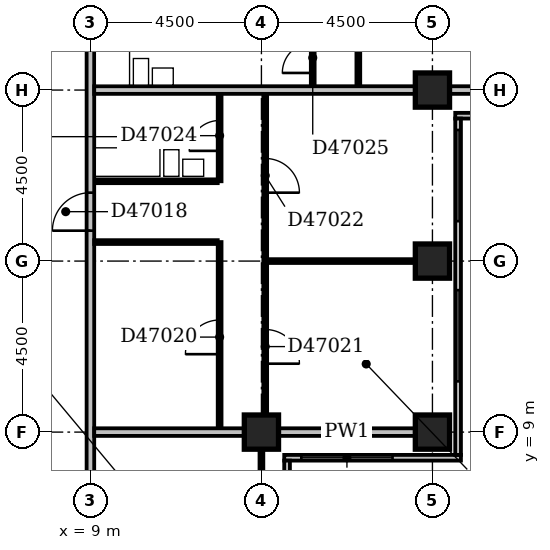
"""IFC4 building model, lengths in metres.
Left out: names, types, materials, properties, quantities, classifications, styles, units other than length and angle.
Written with IfcOpenShell. Run it as: python <this file> out.ifc"""

import sys

from ifc_helpers import new_model, si_unit, direction, frame, frame_2d, origin, origin_2d, place, context, subcontext, project, spatial, rectangle, extrude, element, fill, save


model = new_model("IFC4")
c1 = context("Model", 3, precision=1e-05, world=origin(), true_north=direction((0.0, 1.0)))
c2 = subcontext(c1, "Body", "Model", "MODEL_VIEW")
j1 = project(units=[si_unit("LENGTHUNIT", "METRE"), si_unit("PLANEANGLEUNIT", "RADIAN")], contexts=[c1])
p1 = place(None, origin())
s1 = spatial("IfcSite", under=j1, at=p1, CompositionType="ELEMENT")
p2 = place(p1, origin())
s2 = spatial("IfcBuilding", under=s1, at=p2, CompositionType="ELEMENT")
p3 = place(p2, frame((0.0, 0.0, 186.2)))
s3 = spatial("IfcBuildingStorey", under=s2, at=p3, CompositionType="ELEMENT", Elevation=186.2)
for number, where, z_axis, x_axis in (
    (1, (13.5, 9.0, -0.35), (0.0, 0.0, 1.0), (1.0, 0.0, 0.0)),
    (2, (18.0, 9.0, -0.35), (0.0, 0.0, 1.0), (1.0, 0.0, 0.0)),
    (3, (18.0, 13.5, -0.35), (0.0, 0.0, 1.0), (1.0, 0.0, 0.0)),
    (4, (18.0, 18.0, -0.35), (0.0, 0.0, 1.0), (1.0, 0.0, 0.0)),
):
    element("IfcColumn", number, at=place(p3, frame(where, z_axis=z_axis, x_axis=x_axis)), inside=s3, PredefinedType="COLUMN", context=c2, shape_type="SweptSolid", body=[
        extrude(rectangle(XDim=0.9, YDim=0.9, at=origin_2d()), origin(), (0.0, 0.0, 1.0), 3.65),
    ])
p4 = place(p3, frame((14.175, 3.9, 0.0), z_axis=(0.0, 0.0, 1.0), x_axis=(0.0, 1.0, 0.0)))
e5 = element("IfcWall", 5, at=p4, inside=s3, PredefinedType="STANDARD", context=c2, shape_type="SweptSolid", body=[
    extrude(rectangle(XDim=4.35, YDim=0.15, at=frame_2d((2.175, 0.0))), origin(), (0.0, 0.0, 1.0), 2.7),
])
p5 = place(p4, frame((1.65, 0.0, 0.6)))
e6 = element("IfcOpeningElement", 6, at=p5, cuts=e5, PredefinedType="OPENING", context=c2, shape_type="SweptSolid", body=[
    extrude(rectangle(XDim=2.4, YDim=1.8, at=frame_2d((1.2, 0.9))), frame((0.0, 0.087, 0.0), z_axis=(0.0, -1.0, 0.0), x_axis=(1.0, 0.0, 0.0)), (0.0, 0.0, 1.0), 0.174),
])
p6 = place(p3, frame((14.1, 8.325, 0.0), z_axis=(0.0, 0.0, 1.0), x_axis=(1.0, 0.0, 0.0)))
e7 = element("IfcWall", 7, at=p6, inside=s3, PredefinedType="STANDARD", context=c2, shape_type="SweptSolid", body=[
    extrude(rectangle(XDim=4.65, YDim=0.15, at=frame_2d((2.325, 0.0))), origin(), (0.0, 0.0, 1.0), 2.7),
])
p7 = place(p6, frame((0.45, 0.0, 0.6)))
e8 = element("IfcOpeningElement", 8, at=p7, cuts=e7, PredefinedType="OPENING", context=c2, shape_type="SweptSolid", body=[
    extrude(rectangle(XDim=2.4, YDim=1.8, at=frame_2d((1.2, 0.9))), frame((0.0, 0.087, 0.0), z_axis=(0.0, -1.0, 0.0), x_axis=(1.0, 0.0, 0.0)), (0.0, 0.0, 1.0), 0.174),
])
p8 = place(p3, frame((18.675, 8.4, 0.0), z_axis=(0.0, 0.0, 1.0), x_axis=(0.0, 1.0, 0.0)))
e9 = element("IfcWall", 9, at=p8, inside=s3, PredefinedType="STANDARD", context=c2, shape_type="SweptSolid", body=[
    extrude(rectangle(XDim=8.85, YDim=0.15, at=frame_2d((4.425, 0.0))), origin(), (0.0, 0.0, 1.0), 2.7),
])
p9 = place(p8, frame((1.935, 0.0, 0.6)))
e10 = element("IfcOpeningElement", 10, at=p9, cuts=e9, PredefinedType="OPENING", context=c2, shape_type="SweptSolid", body=[
    extrude(rectangle(XDim=2.4, YDim=1.8, at=frame_2d((1.2, 0.9))), frame((0.0, 0.087, 0.0), z_axis=(0.0, -1.0, 0.0), x_axis=(1.0, 0.0, 0.0)), (0.0, 0.0, 1.0), 0.174),
])
p10 = place(p8, frame((6.15, 0.0, 0.6)))
e11 = element("IfcOpeningElement", 11, at=p10, cuts=e9, PredefinedType="OPENING", context=c2, shape_type="SweptSolid", body=[
    extrude(rectangle(XDim=2.4, YDim=1.8, at=frame_2d((1.2, 0.9))), frame((0.0, 0.087, 0.0), z_axis=(0.0, -1.0, 0.0), x_axis=(1.0, 0.0, 0.0)), (0.0, 0.0, 1.0), 0.174),
])
p11 = place(p3, frame((18.6, 17.325, 0.0), z_axis=(0.0, 0.0, 1.0), x_axis=(1.0, 0.0, 0.0)))
e12 = element("IfcWall", 12, at=p11, inside=s3, PredefinedType="STANDARD", context=c2, shape_type="SweptSolid", body=[
    extrude(rectangle(XDim=4.65, YDim=0.15, at=frame_2d((2.325, 0.0))), origin(), (0.0, 0.0, 1.0), 2.7),
])
p12 = place(p11, frame((0.45, 0.0, 0.6)))
e13 = element("IfcOpeningElement", 13, at=p12, cuts=e12, PredefinedType="OPENING", context=c2, shape_type="SweptSolid", body=[
    extrude(rectangle(XDim=2.4, YDim=1.8, at=frame_2d((1.2, 0.9))), frame((0.0, 0.087, 0.0), z_axis=(0.0, -1.0, 0.0), x_axis=(1.0, 0.0, 0.0)), (0.0, 0.0, 1.0), 0.174),
])
p13 = place(p3, frame((13.5, 4.95, 0.0), z_axis=(0.0, 0.0, 1.0), x_axis=(0.0, 1.0, 0.0)))
e14 = element("IfcWall", 14, at=p13, inside=s3, PredefinedType="PARTITIONING", context=c2, shape_type="SweptSolid", body=[
    extrude(rectangle(XDim=3.6, YDim=0.1, at=frame_2d((1.8, 0.0))), origin(), (0.0, 0.0, 1.0), 2.7),
])
p14 = place(p3, frame((9.0, 5.0, 0.0), z_axis=(0.0, 0.0, 1.0), x_axis=(0.0, 1.0, 0.0)))
e15 = element("IfcWall", 15, at=p14, inside=s3, PredefinedType="PARTITIONING", context=c2, shape_type="SweptSolid", body=[
    extrude(rectangle(XDim=31.0, YDim=0.2, at=frame_2d((15.5, 0.0))), origin(), (0.0, 0.0, 1.0), 3.3),
])
p15 = place(p14, frame((17.8, 0.0, 0.0)))
e16 = element("IfcOpeningElement", 16, at=p15, cuts=e15, PredefinedType="OPENING", context=c2, shape_type="SweptSolid", body=[
    extrude(rectangle(XDim=1.0, YDim=2.1, at=frame_2d((0.5, 1.05))), frame((0.0, 0.112, 0.0), z_axis=(0.0, -1.0, 0.0), x_axis=(1.0, 0.0, 0.0)), (0.0, 0.0, 1.0), 0.224),
])
p16 = place(p14, frame((14.95, 0.0, 0.0)))
e17 = element("IfcOpeningElement", 17, at=p16, cuts=e15, PredefinedType="OPENING", context=c2, shape_type="SweptSolid", body=[
    extrude(rectangle(XDim=1.0, YDim=2.1, at=frame_2d((0.5, 1.05))), frame((0.0, 0.112, 0.0), z_axis=(0.0, -1.0, 0.0), x_axis=(1.0, 0.0, 0.0)), (0.0, 0.0, 1.0), 0.224),
])
p17 = place(p14, frame((9.3, 0.0, 0.0)))
e18 = element("IfcOpeningElement", 18, at=p17, cuts=e15, PredefinedType="OPENING", context=c2, shape_type="SweptSolid", body=[
    extrude(rectangle(XDim=1.0, YDim=2.1, at=frame_2d((0.5, 1.05))), frame((0.0, 0.112, 0.0), z_axis=(0.0, -1.0, 0.0), x_axis=(1.0, 0.0, 0.0)), (0.0, 0.0, 1.0), 0.224),
])
p18 = place(p14, frame((1.5, 0.0, 0.0)))
e19 = element("IfcOpeningElement", 19, at=p18, cuts=e15, PredefinedType="OPENING", context=c2, shape_type="SweptSolid", body=[
    extrude(rectangle(XDim=0.9, YDim=2.1, at=frame_2d((0.45, 1.05))), frame((0.0, 0.112, 0.0), z_axis=(0.0, -1.0, 0.0), x_axis=(1.0, 0.0, 0.0)), (0.0, 0.0, 1.0), 0.224),
])
p19 = place(p3, frame((9.1, 9.0, 0.0), z_axis=(0.0, 0.0, 1.0), x_axis=(1.0, 0.0, 0.0)))
e20 = element("IfcWall", 20, at=p19, inside=s3, PredefinedType="PARTITIONING", context=c2, shape_type="SweptSolid", body=[
    extrude(rectangle(XDim=3.95, YDim=0.2, at=frame_2d((1.975, 0.0))), origin(), (0.0, 0.0, 1.0), 3.3),
])
p20 = place(p3, frame((13.95, 9.0, 0.0), z_axis=(0.0, 0.0, 1.0), x_axis=(1.0, 0.0, 0.0)))
e21 = element("IfcWall", 21, at=p20, inside=s3, PredefinedType="PARTITIONING", context=c2, shape_type="SweptSolid", body=[
    extrude(rectangle(XDim=3.6, YDim=0.2, at=frame_2d((1.8, 0.0))), origin(), (0.0, 0.0, 1.0), 2.7),
])
p21 = place(p3, frame((12.4, 9.1, 0.0), z_axis=(0.0, 0.0, 1.0), x_axis=(0.0, 1.0, 0.0)))
e22 = element("IfcWall", 22, at=p21, inside=s3, PredefinedType="PARTITIONING", context=c2, shape_type="SweptSolid", body=[
    extrude(rectangle(XDim=4.9, YDim=0.1, at=frame_2d((2.45, 0.0))), origin(), (0.0, 0.0, 1.0), 3.3),
])
p22 = place(p21, frame((1.95, 0.0, 0.0)))
e23 = element("IfcOpeningElement", 23, at=p22, cuts=e22, PredefinedType="OPENING", context=c2, shape_type="SweptSolid", body=[
    extrude(rectangle(XDim=0.9, YDim=2.1, at=frame_2d((0.45, 1.05))), frame((0.0, 0.062, 0.0), z_axis=(0.0, -1.0, 0.0), x_axis=(1.0, 0.0, 0.0)), (0.0, 0.0, 1.0), 0.124),
])
p23 = place(p3, frame((13.6, 9.45, 0.0), z_axis=(0.0, 0.0, 1.0), x_axis=(0.0, 1.0, 0.0)))
e24 = element("IfcWall", 24, at=p23, inside=s3, PredefinedType="PARTITIONING", context=c2, shape_type="SweptSolid", body=[
    extrude(rectangle(XDim=8.45, YDim=0.1, at=frame_2d((4.225, 0.0))), origin(), (0.0, 0.0, 1.0), 3.3),
])
p24 = place(p23, frame((1.35, 0.0, 0.0)))
e25 = element("IfcOpeningElement", 25, at=p24, cuts=e24, PredefinedType="OPENING", context=c2, shape_type="SweptSolid", body=[
    extrude(rectangle(XDim=0.9, YDim=2.1, at=frame_2d((0.45, 1.05))), frame((0.0, 0.062, 0.0), z_axis=(0.0, -1.0, 0.0), x_axis=(1.0, 0.0, 0.0)), (0.0, 0.0, 1.0), 0.124),
])
p25 = place(p23, frame((5.85, 0.0, 0.0)))
e26 = element("IfcOpeningElement", 26, at=p25, cuts=e24, PredefinedType="OPENING", context=c2, shape_type="SweptSolid", body=[
    extrude(rectangle(XDim=0.9, YDim=2.1, at=frame_2d((0.45, 1.05))), frame((0.0, 0.062, 0.0), z_axis=(0.0, -1.0, 0.0), x_axis=(1.0, 0.0, 0.0)), (0.0, 0.0, 1.0), 0.124),
])
p26 = place(p3, frame((13.65, 13.5, 0.0), z_axis=(0.0, 0.0, 1.0), x_axis=(1.0, 0.0, 0.0)))
e27 = element("IfcWall", 27, at=p26, inside=s3, PredefinedType="PARTITIONING", context=c2, shape_type="SweptSolid", body=[
    extrude(rectangle(XDim=3.9, YDim=0.1, at=frame_2d((1.95, 0.0))), origin(), (0.0, 0.0, 1.0), 3.3),
])
p27 = place(p3, frame((9.1, 14.0, 0.0), z_axis=(0.0, 0.0, 1.0), x_axis=(1.0, 0.0, 0.0)))
e28 = element("IfcWall", 28, at=p27, inside=s3, PredefinedType="PARTITIONING", context=c2, shape_type="SweptSolid", body=[
    extrude(rectangle(XDim=3.25, YDim=0.1, at=frame_2d((1.625, 0.0))), origin(), (0.0, 0.0, 1.0), 3.3),
])
p28 = place(p3, frame((9.1, 15.6, 0.0), z_axis=(0.0, 0.0, 1.0), x_axis=(1.0, 0.0, 0.0)))
e29 = element("IfcWall", 29, at=p28, inside=s3, PredefinedType="PLUMBINGWALL", context=c2, shape_type="SweptSolid", body=[
    extrude(rectangle(XDim=3.25, YDim=0.1, at=frame_2d((1.625, 0.0))), origin(), (0.0, 0.0, 1.0), 3.3),
])
p29 = place(p3, frame((12.4, 15.6, 0.0), z_axis=(0.0, 0.0, 1.0), x_axis=(0.0, 1.0, 0.0)))
e30 = element("IfcWall", 30, at=p29, inside=s3, PredefinedType="PARTITIONING", context=c2, shape_type="SweptSolid", body=[
    extrude(rectangle(XDim=2.3, YDim=0.1, at=frame_2d((1.15, 0.0))), origin(), (0.0, 0.0, 1.0), 3.3),
])
p30 = place(p29, frame((0.8, 0.0, 0.0)))
e31 = element("IfcOpeningElement", 31, at=p30, cuts=e30, PredefinedType="OPENING", context=c2, shape_type="SweptSolid", body=[
    extrude(rectangle(XDim=0.8, YDim=2.1, at=frame_2d((0.4, 1.05))), frame((0.0, 0.062, 0.0), z_axis=(0.0, -1.0, 0.0), x_axis=(1.0, 0.0, 0.0)), (0.0, 0.0, 1.0), 0.124),
])
p31 = place(p3, frame((9.1, 18.0, 0.0), z_axis=(0.0, 0.0, 1.0), x_axis=(1.0, 0.0, 0.0)))
e32 = element("IfcWall", 32, at=p31, inside=s3, PredefinedType="PARTITIONING", context=c2, shape_type="SweptSolid", body=[
    extrude(rectangle(XDim=8.45, YDim=0.2, at=frame_2d((4.225, 0.0))), origin(), (0.0, 0.0, 1.0), 2.6),
])
p32 = place(p3, frame((18.45, 18.0, 0.0), z_axis=(0.0, 0.0, 1.0), x_axis=(1.0, 0.0, 0.0)))
e33 = element("IfcWall", 33, at=p32, inside=s3, PredefinedType="PARTITIONING", context=c2, shape_type="SweptSolid", body=[
    extrude(rectangle(XDim=3.6, YDim=0.2, at=frame_2d((1.8, 0.0))), origin(), (0.0, 0.0, 1.0), 2.7),
])
p33 = place(p3, frame((14.85, 18.1, 0.0), z_axis=(0.0, 0.0, 1.0), x_axis=(0.0, 1.0, 0.0)))
e34 = element("IfcWall", 34, at=p33, inside=s3, PredefinedType="PARTITIONING", context=c2, shape_type="SweptSolid", body=[
    extrude(rectangle(XDim=1.6, YDim=0.1, at=frame_2d((0.8, 0.0))), origin(), (0.0, 0.0, 1.0), 3.3),
])
p34 = place(p33, frame((0.35, 0.0, 0.0)))
e35 = element("IfcOpeningElement", 35, at=p34, cuts=e34, PredefinedType="OPENING", context=c2, shape_type="SweptSolid", body=[
    extrude(rectangle(XDim=0.8, YDim=2.1, at=frame_2d((0.4, 1.05))), frame((0.0, 0.062, 0.0), z_axis=(0.0, -1.0, 0.0), x_axis=(1.0, 0.0, 0.0)), (0.0, 0.0, 1.0), 0.124),
])
p35 = place(p3, frame((16.05, 18.1, 0.0), z_axis=(0.0, 0.0, 1.0), x_axis=(0.0, 1.0, 0.0)))
e36 = element("IfcWall", 36, at=p35, inside=s3, PredefinedType="PARTITIONING", context=c2, shape_type="SweptSolid", body=[
    extrude(rectangle(XDim=4.3, YDim=0.1, at=frame_2d((2.15, 0.0))), origin(), (0.0, 0.0, 1.0), 3.3),
])
p36 = place(p35, frame((1.7, 0.0, 0.0)))
e37 = element("IfcOpeningElement", 37, at=p36, cuts=e36, PredefinedType="OPENING", context=c2, shape_type="SweptSolid", body=[
    extrude(rectangle(XDim=0.9, YDim=2.1, at=frame_2d((0.45, 1.05))), frame((0.0, 0.062, 0.0), z_axis=(0.0, -1.0, 0.0), x_axis=(1.0, 0.0, 0.0)), (0.0, 0.0, 1.0), 0.124),
])
p37 = place(p7, origin())
e38 = element("IfcWindow", 38, at=p37, inside=s3, PartitioningType="SINGLE_PANEL", PredefinedType="WINDOW", context=c2, shape_type="SweptSolid", body=[
    extrude(rectangle(XDim=2.4, YDim=1.8, at=frame_2d((1.2, 0.9))), frame((0.0, 0.03, 0.0), z_axis=(0.0, -1.0, 0.0), x_axis=(1.0, 0.0, 0.0)), (0.0, 0.0, 1.0), 0.06),
])
fill(e8, e38)
p38 = place(p9, origin())
e39 = element("IfcWindow", 39, at=p38, inside=s3, PartitioningType="SINGLE_PANEL", PredefinedType="WINDOW", context=c2, shape_type="SweptSolid", body=[
    extrude(rectangle(XDim=2.4, YDim=1.8, at=frame_2d((1.2, 0.9))), frame((0.0, 0.03, 0.0), z_axis=(0.0, -1.0, 0.0), x_axis=(1.0, 0.0, 0.0)), (0.0, 0.0, 1.0), 0.06),
])
fill(e10, e39)
p39 = place(p10, origin())
e40 = element("IfcWindow", 40, at=p39, inside=s3, PartitioningType="SINGLE_PANEL", PredefinedType="WINDOW", context=c2, shape_type="SweptSolid", body=[
    extrude(rectangle(XDim=2.4, YDim=1.8, at=frame_2d((1.2, 0.9))), frame((0.0, 0.03, 0.0), z_axis=(0.0, -1.0, 0.0), x_axis=(1.0, 0.0, 0.0)), (0.0, 0.0, 1.0), 0.06),
])
fill(e11, e40)
p40 = place(p17, origin())
e41 = element("IfcDoor", 41, at=p40, inside=s3, OperationType="SINGLE_SWING_LEFT", PredefinedType="DOOR", context=c2, shape_type="SweptSolid", body=[
    extrude(rectangle(XDim=1.0, YDim=2.1, at=frame_2d((0.5, 1.05))), frame((0.0, 0.025, 0.0), z_axis=(0.0, -1.0, 0.0), x_axis=(1.0, 0.0, 0.0)), (0.0, 0.0, 1.0), 0.05),
])
fill(e18, e41)
p41 = place(p22, origin())
e42 = element("IfcDoor", 42, at=p41, inside=s3, OperationType="SINGLE_SWING_LEFT", PredefinedType="DOOR", context=c2, shape_type="SweptSolid", body=[
    extrude(rectangle(XDim=0.9, YDim=2.1, at=frame_2d((0.45, 1.05))), frame((0.0, 0.025, 0.0), z_axis=(0.0, -1.0, 0.0), x_axis=(1.0, 0.0, 0.0)), (0.0, 0.0, 1.0), 0.05),
])
fill(e23, e42)
p42 = place(p24, frame((0.9, 0.0, 0.0), z_axis=(0.0, 0.0, 1.0), x_axis=(-1.0, 0.0, 0.0)))
e43 = element("IfcDoor", 43, at=p42, inside=s3, OperationType="SINGLE_SWING_RIGHT", PredefinedType="DOOR", context=c2, shape_type="SweptSolid", body=[
    extrude(rectangle(XDim=0.9, YDim=2.1, at=frame_2d((0.45, 1.05))), frame((0.0, 0.025, 0.0), z_axis=(0.0, -1.0, 0.0), x_axis=(1.0, 0.0, 0.0)), (0.0, 0.0, 1.0), 0.05),
])
fill(e25, e43)
p43 = place(p25, frame((0.9, 0.0, 0.0), z_axis=(0.0, 0.0, 1.0), x_axis=(-1.0, 0.0, 0.0)))
e44 = element("IfcDoor", 44, at=p43, inside=s3, OperationType="SINGLE_SWING_RIGHT", PredefinedType="DOOR", context=c2, shape_type="SweptSolid", body=[
    extrude(rectangle(XDim=0.9, YDim=2.1, at=frame_2d((0.45, 1.05))), frame((0.0, 0.025, 0.0), z_axis=(0.0, -1.0, 0.0), x_axis=(1.0, 0.0, 0.0)), (0.0, 0.0, 1.0), 0.05),
])
fill(e26, e44)
p44 = place(p30, origin())
e45 = element("IfcDoor", 45, at=p44, inside=s3, OperationType="SINGLE_SWING_LEFT", PredefinedType="DOOR", context=c2, shape_type="SweptSolid", body=[
    extrude(rectangle(XDim=0.8, YDim=2.1, at=frame_2d((0.4, 1.05))), frame((0.0, 0.025, 0.0), z_axis=(0.0, -1.0, 0.0), x_axis=(1.0, 0.0, 0.0)), (0.0, 0.0, 1.0), 0.05),
])
fill(e31, e45)
p45 = place(p34, origin())
e46 = element("IfcDoor", 46, at=p45, inside=s3, OperationType="SINGLE_SWING_LEFT", PredefinedType="DOOR", context=c2, shape_type="SweptSolid", body=[
    extrude(rectangle(XDim=0.8, YDim=2.1, at=frame_2d((0.4, 1.05))), frame((0.0, 0.025, 0.0), z_axis=(0.0, -1.0, 0.0), x_axis=(1.0, 0.0, 0.0)), (0.0, 0.0, 1.0), 0.05),
])
fill(e35, e46)
save(model, sys.argv[1])
